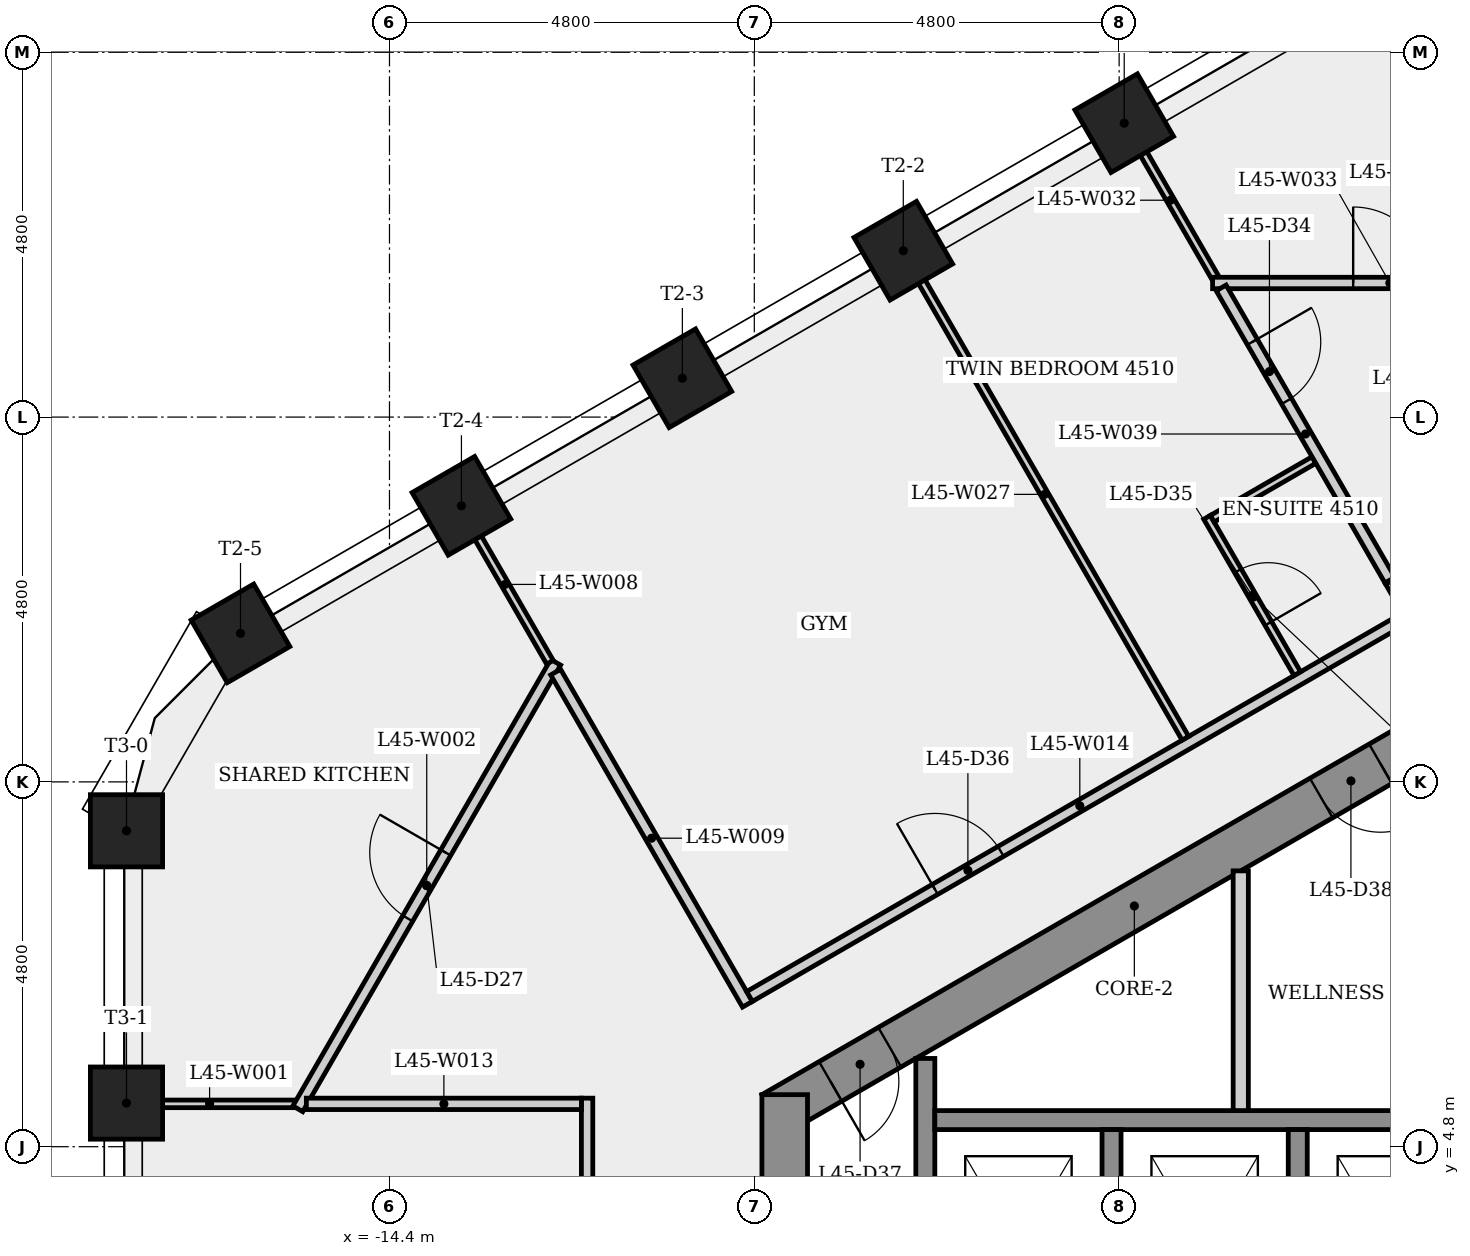
"""IFC4 building model, lengths in metres.
Left out: names, types, materials, properties, quantities, classifications, styles, units other than length and angle.
Written with IfcOpenShell. Run it as: python <this file> out.ifc"""

import sys

from ifc_helpers import new_model, si_unit, direction, frame, frame_2d, origin, origin_2d, place, context, subcontext, project, spatial, rectangle, extrude, element, fill, save


model = new_model("IFC4")
c1 = context("Model", 3, precision=1e-05, world=origin(), true_north=direction((0.0, 1.0)))
c2 = subcontext(c1, "Body", "Model", "MODEL_VIEW")
j1 = project(units=[si_unit("LENGTHUNIT", "METRE"), si_unit("PLANEANGLEUNIT", "RADIAN")], contexts=[c1])
p1 = place(None, origin())
s1 = spatial("IfcSite", under=j1, at=p1, CompositionType="ELEMENT")
p2 = place(p1, origin())
s2 = spatial("IfcBuilding", under=s1, at=p2, CompositionType="ELEMENT")
p3 = place(p2, frame((0.0, 0.0, 169.7)))
s3 = spatial("IfcBuildingStorey", under=s2, at=p3, CompositionType="ELEMENT", Elevation=169.7)
p4 = place(p3, frame((0.15, 10.71, 0.0), z_axis=(0.0, 0.0, 1.0), x_axis=(-0.866023993627, -0.500002442456, 0.0)))
e1 = element("IfcWall", 1, at=p4, inside=s3, PredefinedType="SHEAR", context=c2, shape_type="SweptSolid", body=[
    extrude(rectangle(XDim=10.97, YDim=0.6, at=frame_2d((5.485, 0.0))), origin(), (0.0, 0.0, 1.0), 3.4),
])
p5 = place(p4, frame((9.201, 0.0, 0.0)))
e2 = element("IfcOpeningElement", 2, at=p5, cuts=e1, PredefinedType="OPENING", context=c2, shape_type="SweptSolid", body=[
    extrude(rectangle(XDim=0.9, YDim=2.1, at=frame_2d((0.45, 1.05))), frame((0.0, 0.31, 0.0), z_axis=(0.0, -1.0, 0.0), x_axis=(1.0, 0.0, 0.0)), (0.0, 0.0, 1.0), 0.62),
])
p6 = place(p4, frame((1.744, 0.0, 0.0)))
e3 = element("IfcOpeningElement", 3, at=p6, cuts=e1, PredefinedType="OPENING", context=c2, shape_type="SweptSolid", body=[
    extrude(rectangle(XDim=0.9, YDim=2.1, at=frame_2d((0.45, 1.05))), frame((0.0, 0.31, 0.0), z_axis=(0.0, -1.0, 0.0), x_axis=(1.0, 0.0, 0.0)), (0.0, 0.0, 1.0), 0.62),
])
p7 = place(p3, frame((-9.2, 5.485, 0.0), z_axis=(0.0, 0.0, 1.0), x_axis=(0.0, -1.0, 0.0)))
e4 = element("IfcWall", 4, at=p7, inside=s3, PredefinedType="SHEAR", context=c2, shape_type="SweptSolid", body=[
    extrude(rectangle(XDim=10.97, YDim=0.6, at=frame_2d((5.485, 0.0))), origin(), (0.0, 0.0, 1.0), 3.4),
])
p8 = place(p7, frame((8.516, 0.0, 0.0)))
e5 = element("IfcOpeningElement", 5, at=p8, cuts=e4, PredefinedType="OPENING", context=c2, shape_type="SweptSolid", body=[
    extrude(rectangle(XDim=0.9, YDim=2.1, at=frame_2d((0.45, 1.05))), frame((0.0, 0.31, 0.0), z_axis=(0.0, -1.0, 0.0), x_axis=(1.0, 0.0, 0.0)), (0.0, 0.0, 1.0), 0.62),
])
p9 = place(p7, frame((4.685, 0.0, 0.0)))
e6 = element("IfcOpeningElement", 6, at=p9, cuts=e4, PredefinedType="OPENING", context=c2, shape_type="SweptSolid", body=[
    extrude(rectangle(XDim=1.6, YDim=2.1, at=frame_2d((0.8, 1.05))), frame((0.0, 0.31, 0.0), z_axis=(0.0, -1.0, 0.0), x_axis=(1.0, 0.0, 0.0)), (0.0, 0.0, 1.0), 0.62),
])
for number, where, z_axis, x_axis in (
    (7, (-4.733, 18.267, 0.0), (0.0, 0.0, 1.0), (-0.5, 0.866, 0.0)),
    (8, (-7.64, 16.589, 0.0), (0.0, 0.0, 1.0), (-0.5, 0.866, 0.0)),
    (9, (-10.547, 14.911, 0.0), (0.0, 0.0, 1.0), (-0.5, 0.866, 0.0)),
    (10, (-13.453, 13.233, 0.0), (0.0, 0.0, 1.0), (-0.5, 0.866, 0.0)),
    (11, (-16.36, 11.554, 0.0), (0.0, 0.0, 1.0), (-0.5, 0.866, 0.0)),
    (12, (-17.86, 8.956, 0.0), (0.0, 0.0, 1.0), (-1.0, 0.0, 0.0)),
    (13, (-17.86, 5.374, 0.0), (0.0, 0.0, 1.0), (-1.0, 0.0, 0.0)),
):
    element("IfcColumn", number, at=place(p3, frame(where, z_axis=z_axis, x_axis=x_axis)), inside=s3, PredefinedType="COLUMN", context=c2, shape_type="SweptSolid", body=[
        extrude(rectangle(XDim=0.95, YDim=0.95, at=origin_2d()), origin(), (0.0, 0.0, 1.0), 3.4),
    ])
p10 = place(p3, frame((-15.644, 5.364, 0.0), z_axis=(0.0, 0.0, 1.0), x_axis=(-1.0, 0.0, 0.0)))
e14 = element("IfcWall", 14, at=p10, inside=s3, PredefinedType="PARTITIONING", context=c2, shape_type="SweptSolid", body=[
    extrude(rectangle(XDim=2.246, YDim=0.1, at=frame_2d((1.123, 0.0))), origin(), (0.0, 0.0, 1.0), 3.05),
])
p11 = place(p3, frame((-15.606, 5.299, 0.0), z_axis=(0.0, 0.0, 1.0), x_axis=(0.500024587347, 0.866011207807, 0.0)))
e15 = element("IfcWall", 15, at=p11, inside=s3, PredefinedType="PARTITIONING", context=c2, shape_type="SweptSolid", body=[
    extrude(rectangle(XDim=6.785, YDim=0.15, at=frame_2d((3.393, 0.0))), origin(), (0.0, 0.0, 1.0), 3.05),
])
p12 = place(p11, frame((2.892, 0.0, 0.0)))
e16 = element("IfcOpeningElement", 16, at=p12, cuts=e15, PredefinedType="OPENING", context=c2, shape_type="SweptSolid", body=[
    extrude(rectangle(XDim=1.0, YDim=2.1, at=frame_2d((0.5, 1.05))), frame((0.0, 0.085, 0.0), z_axis=(0.0, -1.0, 0.0), x_axis=(1.0, 0.0, 0.0)), (0.0, 0.0, 1.0), 0.17),
])
p13 = place(p3, frame((-13.471, 13.222, 0.0), z_axis=(0.0, 0.0, 1.0), x_axis=(0.499969694265, -0.866042900102, 0.0)))
e17 = element("IfcWall", 17, at=p13, inside=s3, PredefinedType="PARTITIONING", context=c2, shape_type="SweptSolid", body=[
    extrude(rectangle(XDim=2.365, YDim=0.1, at=frame_2d((1.183, 0.0))), origin(), (0.0, 0.0, 1.0), 3.05),
])
p14 = place(p3, frame((-12.214, 11.044, 0.0), z_axis=(0.0, 0.0, 1.0), x_axis=(0.499973712363, -0.866040580427, 0.0)))
e18 = element("IfcWall", 18, at=p14, inside=s3, PredefinedType="PARTITIONING", context=c2, shape_type="SweptSolid", body=[
    extrude(rectangle(XDim=5.047, YDim=0.15, at=frame_2d((2.523, 0.0))), origin(), (0.0, 0.0, 1.0), 3.05),
])
p15 = place(p3, frame((-11.8, -5.289, 0.0), z_axis=(0.0, 0.0, 1.0), x_axis=(0.0, 1.0, 0.0)))
e19 = element("IfcWall", 19, at=p15, inside=s3, PredefinedType="PARTITIONING", context=c2, shape_type="SweptSolid", body=[
    extrude(rectangle(XDim=10.727, YDim=0.15, at=frame_2d((5.364, 0.0))), origin(), (0.0, 0.0, 1.0), 3.05),
])
p16 = place(p15, frame((6.612, 0.0, 0.0)))
e20 = element("IfcOpeningElement", 20, at=p16, cuts=e19, PredefinedType="OPENING", context=c2, shape_type="SweptSolid", body=[
    extrude(rectangle(XDim=1.0, YDim=2.1, at=frame_2d((0.5, 1.05))), frame((0.0, 0.085, 0.0), z_axis=(0.0, -1.0, 0.0), x_axis=(1.0, 0.0, 0.0)), (0.0, 0.0, 1.0), 0.17),
])
p17 = place(p15, frame((1.271, 0.0, 0.0)))
e21 = element("IfcOpeningElement", 21, at=p17, cuts=e19, PredefinedType="OPENING", context=c2, shape_type="SweptSolid", body=[
    extrude(rectangle(XDim=1.0, YDim=2.1, at=frame_2d((0.5, 1.05))), frame((0.0, 0.085, 0.0), z_axis=(0.0, -1.0, 0.0), x_axis=(1.0, 0.0, 0.0)), (0.0, 0.0, 1.0), 0.17),
])
p18 = place(p3, frame((-11.875, 5.364, 0.0), z_axis=(0.0, 0.0, 1.0), x_axis=(-1.0, 0.0, 0.0)))
e22 = element("IfcWall", 22, at=p18, inside=s3, PredefinedType="PARTITIONING", context=c2, shape_type="SweptSolid", body=[
    extrude(rectangle(XDim=3.619, YDim=0.15, at=frame_2d((1.809, 0.0))), origin(), (0.0, 0.0, 1.0), 3.05),
])
p19 = place(p3, frame((-9.663, 6.776, 0.0), z_axis=(0.0, 0.0, 1.0), x_axis=(0.866026375365, 0.499998317169, 0.0)))
e23 = element("IfcWall", 23, at=p19, inside=s3, PredefinedType="PARTITIONING", context=c2, shape_type="SweptSolid", body=[
    extrude(rectangle(XDim=10.036, YDim=0.15, at=frame_2d((5.018, 0.0))), origin(), (0.0, 0.0, 1.0), 3.05),
])
p20 = place(p19, frame((2.818, 0.0, 0.0)))
e24 = element("IfcOpeningElement", 24, at=p20, cuts=e23, PredefinedType="OPENING", context=c2, shape_type="SweptSolid", body=[
    extrude(rectangle(XDim=1.0, YDim=2.1, at=frame_2d((0.5, 1.05))), frame((0.0, 0.085, 0.0), z_axis=(0.0, -1.0, 0.0), x_axis=(1.0, 0.0, 0.0)), (0.0, 0.0, 1.0), 0.17),
])
p21 = place(p3, frame((-7.35, 1.925, 0.0), z_axis=(0.0, 0.0, 1.0), x_axis=(0.0, 1.0, 0.0)))
e25 = element("IfcWall", 25, at=p21, inside=s3, PredefinedType="SHEAR", context=c2, shape_type="SweptSolid", body=[
    extrude(rectangle(XDim=4.036, YDim=0.25, at=frame_2d((2.018, 0.0))), origin(), (0.0, 0.0, 1.0), 3.05),
])
p22 = place(p3, frame((-7.225, 5.15, 0.0), z_axis=(0.0, 0.0, 1.0), x_axis=(1.0, 0.0, 0.0)))
e26 = element("IfcWall", 26, at=p22, inside=s3, PredefinedType="SHEAR", context=c2, shape_type="SweptSolid", body=[
    extrude(rectangle(XDim=14.7, YDim=0.25, at=frame_2d((7.35, 0.0))), origin(), (0.0, 0.0, 1.0), 3.05),
])
p23 = place(p3, frame((-4.9, 5.025, 0.0), z_axis=(0.0, 0.0, 1.0), x_axis=(0.0, -1.0, 0.0)))
e27 = element("IfcWall", 27, at=p23, inside=s3, PredefinedType="SHEAR", context=c2, shape_type="SweptSolid", body=[
    extrude(rectangle(XDim=3.1, YDim=0.25, at=frame_2d((1.55, 0.0))), origin(), (0.0, 0.0, 1.0), 3.4),
])
p24 = place(p3, frame((-3.928, 10.174, 0.0), z_axis=(0.0, 0.0, 1.0), x_axis=(-0.500011399757, 0.866018822032, 0.0)))
e28 = element("IfcWall", 28, at=p24, inside=s3, PredefinedType="PARTITIONING", context=c2, shape_type="SweptSolid", body=[
    extrude(rectangle(XDim=7.411, YDim=0.1, at=frame_2d((3.706, 0.0))), origin(), (0.0, 0.0, 1.0), 3.05),
])
p25 = place(p3, frame((-3.644, 13.081, 0.0), z_axis=(0.0, 0.0, 1.0), x_axis=(0.499986429846, -0.866033238375, 0.0)))
e29 = element("IfcWall", 29, at=p25, inside=s3, PredefinedType="PARTITIONING", context=c2, shape_type="SweptSolid", body=[
    extrude(rectangle(XDim=2.375, YDim=0.1, at=frame_2d((1.188, 0.0))), origin(), (0.0, 0.0, 1.0), 3.05),
])
p26 = place(p25, frame((0.812, 0.0, 0.0)))
e30 = element("IfcOpeningElement", 30, at=p26, cuts=e29, PredefinedType="OPENING", context=c2, shape_type="SweptSolid", body=[
    extrude(rectangle(XDim=0.8, YDim=2.1, at=frame_2d((0.4, 1.05))), frame((0.0, 0.06, 0.0), z_axis=(0.0, -1.0, 0.0), x_axis=(1.0, 0.0, 0.0)), (0.0, 0.0, 1.0), 0.12),
])
p27 = place(p3, frame((-3.533, 16.229, 0.0), z_axis=(0.0, 0.0, 1.0), x_axis=(-0.499969694265, 0.866042900102, 0.0)))
e31 = element("IfcWall", 31, at=p27, inside=s3, PredefinedType="PARTITIONING", context=c2, shape_type="SweptSolid", body=[
    extrude(rectangle(XDim=2.365, YDim=0.1, at=frame_2d((1.183, 0.0))), origin(), (0.0, 0.0, 1.0), 3.05),
])
p28 = place(p3, frame((-3.57, 16.165, 0.0), z_axis=(0.0, 0.0, 1.0), x_axis=(1.0, 0.0, 0.0)))
e32 = element("IfcWall", 32, at=p28, inside=s3, PredefinedType="PARTITIONING", context=c2, shape_type="SweptSolid", body=[
    extrude(rectangle(XDim=4.664, YDim=0.15, at=frame_2d((2.332, 0.0))), origin(), (0.0, 0.0, 1.0), 3.05),
])
p29 = place(p28, frame((1.849, 0.0, 0.0)))
e33 = element("IfcOpeningElement", 33, at=p29, cuts=e32, PredefinedType="OPENING", context=c2, shape_type="SweptSolid", body=[
    extrude(rectangle(XDim=1.0, YDim=2.1, at=frame_2d((0.5, 1.05))), frame((0.0, 0.085, 0.0), z_axis=(0.0, -1.0, 0.0), x_axis=(1.0, 0.0, 0.0)), (0.0, 0.0, 1.0), 0.17),
])
p30 = place(p3, frame((-3.2, 8.429, 0.0), z_axis=(0.0, 0.0, 1.0), x_axis=(0.0, -1.0, 0.0)))
e34 = element("IfcWall", 34, at=p30, inside=s3, PredefinedType="PARTITIONING", context=c2, shape_type="SweptSolid", body=[
    extrude(rectangle(XDim=3.154, YDim=0.2, at=frame_2d((1.577, 0.0))), origin(), (0.0, 0.0, 1.0), 3.05),
])
p31 = place(p3, frame((-2.45, 5.025, 0.0), z_axis=(0.0, 0.0, 1.0), x_axis=(0.0, -1.0, 0.0)))
e35 = element("IfcWall", 35, at=p31, inside=s3, PredefinedType="SHEAR", context=c2, shape_type="SweptSolid", body=[
    extrude(rectangle(XDim=3.1, YDim=0.25, at=frame_2d((1.55, 0.0))), origin(), (0.0, 0.0, 1.0), 3.4),
])
p32 = place(p3, frame((-2.237, 13.835, 0.0), z_axis=(0.0, 0.0, 1.0), x_axis=(-0.866056658381, -0.499945861543, 0.0)))
e36 = element("IfcWall", 36, at=p32, inside=s3, PredefinedType="PARTITIONING", context=c2, shape_type="SweptSolid", body=[
    extrude(rectangle(XDim=1.545, YDim=0.1, at=frame_2d((0.772, 0.0))), origin(), (0.0, 0.0, 1.0), 3.05),
])
p33 = place(p3, frame((-3.458, 16.1, 0.0), z_axis=(0.0, 0.0, 1.0), x_axis=(0.500019192393, -0.866014322768, 0.0)))
e37 = element("IfcWall", 37, at=p33, inside=s3, PredefinedType="PARTITIONING", context=c2, shape_type="SweptSolid", body=[
    extrude(rectangle(XDim=4.439, YDim=0.15, at=frame_2d((2.22, 0.0))), origin(), (0.0, 0.0, 1.0), 3.05),
])
p34 = place(p33, frame((0.821, 0.0, 0.0)))
e38 = element("IfcOpeningElement", 38, at=p34, cuts=e37, PredefinedType="OPENING", context=c2, shape_type="SweptSolid", body=[
    extrude(rectangle(XDim=0.9, YDim=2.1, at=frame_2d((0.45, 1.05))), frame((0.0, 0.085, 0.0), z_axis=(0.0, -1.0, 0.0), x_axis=(1.0, 0.0, 0.0)), (0.0, 0.0, 1.0), 0.17),
])
p35 = place(p3, frame((-1.228, 12.238, 0.0), z_axis=(0.0, 0.0, 1.0), x_axis=(0.499765374431, -0.86616082255, 0.0)))
e39 = element("IfcWall", 39, at=p35, inside=s3, PredefinedType="PARTITIONING", context=c2, shape_type="SweptSolid", body=[
    extrude(rectangle(XDim=0.492, YDim=0.15, at=frame_2d((0.246, 0.0))), origin(), (0.0, 0.0, 1.0), 3.05),
])
p36 = place(p29, origin())
e40 = element("IfcDoor", 40, at=p36, inside=s3, OperationType="SINGLE_SWING_LEFT", PredefinedType="DOOR", context=c2, shape_type="SweptSolid", body=[
    extrude(rectangle(XDim=1.0, YDim=2.1, at=frame_2d((0.5, 1.05))), frame((0.0, 0.025, 0.0), z_axis=(0.0, -1.0, 0.0), x_axis=(1.0, 0.0, 0.0)), (0.0, 0.0, 1.0), 0.05),
])
fill(e33, e40)
p37 = place(p12, origin())
e41 = element("IfcDoor", 41, at=p37, inside=s3, OperationType="SINGLE_SWING_RIGHT", PredefinedType="DOOR", context=c2, shape_type="SweptSolid", body=[
    extrude(rectangle(XDim=1.0, YDim=2.1, at=frame_2d((0.5, 1.05))), frame((0.0, 0.025, 0.0), z_axis=(0.0, -1.0, 0.0), x_axis=(1.0, 0.0, 0.0)), (0.0, 0.0, 1.0), 0.05),
])
fill(e16, e41)
p38 = place(p34, origin())
e42 = element("IfcDoor", 42, at=p38, inside=s3, OperationType="SINGLE_SWING_LEFT", PredefinedType="DOOR", context=c2, shape_type="SweptSolid", body=[
    extrude(rectangle(XDim=0.9, YDim=2.1, at=frame_2d((0.45, 1.05))), frame((0.0, 0.025, 0.0), z_axis=(0.0, -1.0, 0.0), x_axis=(1.0, 0.0, 0.0)), (0.0, 0.0, 1.0), 0.05),
])
fill(e38, e42)
p39 = place(p26, origin())
e43 = element("IfcDoor", 43, at=p39, inside=s3, OperationType="SINGLE_SWING_RIGHT", PredefinedType="DOOR", context=c2, shape_type="SweptSolid", body=[
    extrude(rectangle(XDim=0.8, YDim=2.1, at=frame_2d((0.4, 1.05))), frame((0.0, 0.025, 0.0), z_axis=(0.0, -1.0, 0.0), x_axis=(1.0, 0.0, 0.0)), (0.0, 0.0, 1.0), 0.05),
])
fill(e30, e43)
p40 = place(p20, origin())
e44 = element("IfcDoor", 44, at=p40, inside=s3, OperationType="SINGLE_SWING_LEFT", PredefinedType="DOOR", context=c2, shape_type="SweptSolid", body=[
    extrude(rectangle(XDim=1.0, YDim=2.1, at=frame_2d((0.5, 1.05))), frame((0.0, 0.025, 0.0), z_axis=(0.0, -1.0, 0.0), x_axis=(1.0, 0.0, 0.0)), (0.0, 0.0, 1.0), 0.05),
])
fill(e24, e44)
p41 = place(p5, origin())
e45 = element("IfcDoor", 45, at=p41, inside=s3, OperationType="SINGLE_SWING_RIGHT", PredefinedType="DOOR", context=c2, shape_type="SweptSolid", body=[
    extrude(rectangle(XDim=0.9, YDim=2.1, at=frame_2d((0.45, 1.05))), frame((0.0, 0.025, 0.0), z_axis=(0.0, -1.0, 0.0), x_axis=(1.0, 0.0, 0.0)), (0.0, 0.0, 1.0), 0.05),
])
fill(e2, e45)
p42 = place(p6, origin())
e46 = element("IfcDoor", 46, at=p42, inside=s3, OperationType="SINGLE_SWING_LEFT", PredefinedType="DOOR", context=c2, shape_type="SweptSolid", body=[
    extrude(rectangle(XDim=0.9, YDim=2.1, at=frame_2d((0.45, 1.05))), frame((0.0, 0.025, 0.0), z_axis=(0.0, -1.0, 0.0), x_axis=(1.0, 0.0, 0.0)), (0.0, 0.0, 1.0), 0.05),
])
fill(e3, e46)
save(model, sys.argv[1])
